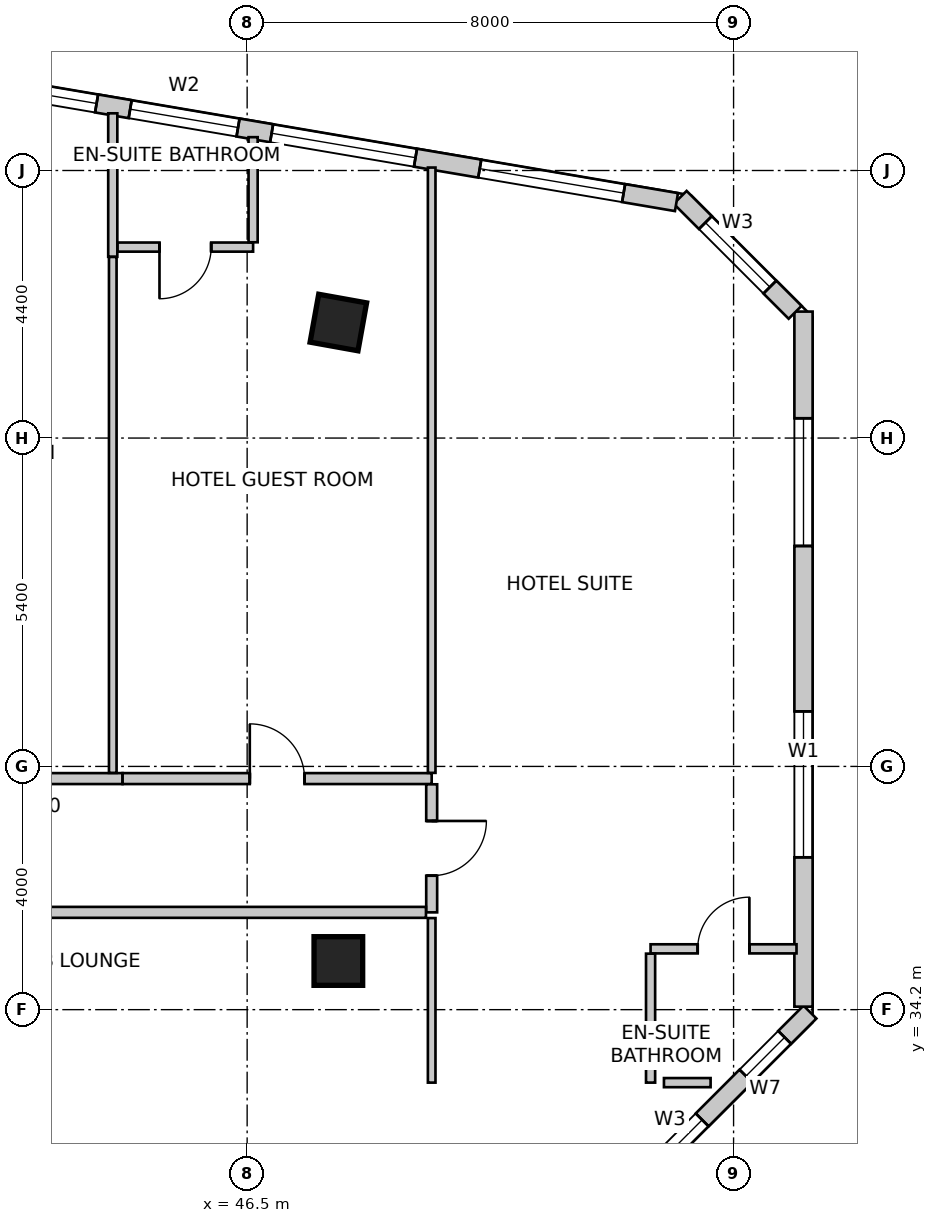
"""IFC4 building model, lengths in metres.
Left out: names, types, materials, properties, quantities, classifications, styles, units other than length and angle.
Written with IfcOpenShell. Run it as: python <this file> out.ifc"""

import sys

from ifc_helpers import new_model, si_unit, direction, frame, frame_2d, origin, origin_2d, place, context, subcontext, project, spatial, rectangle, extrude, source, transform, mapped, element, fill, save


model = new_model("IFC4")
c1 = context("Model", 3, precision=1e-05, world=origin(), true_north=direction((0.0, 1.0)))
c2 = subcontext(c1, "Body", "Model", "MODEL_VIEW")
j1 = project(units=[si_unit("LENGTHUNIT", "METRE"), si_unit("PLANEANGLEUNIT", "RADIAN")], contexts=[c1])
p1 = place(None, origin())
s1 = spatial("IfcSite", under=j1, at=p1, CompositionType="ELEMENT")
p2 = place(p1, origin())
s2 = spatial("IfcBuilding", under=s1, at=p2, CompositionType="ELEMENT")
p3 = place(p2, frame((0.0, 0.0, 117.8)))
s3 = spatial("IfcBuildingStorey", under=s2, at=p3, CompositionType="ELEMENT", Elevation=117.8)
m1 = source(origin(), c2, "Body", "SweptSolid", [
    extrude(rectangle(XDim=0.8, YDim=0.8, at=origin_2d()), origin(), (0.0, 0.0, 1.0), 3.6),
])
for number, where, z_axis, x_axis in (
    (1, (48.0, 45.5, 0.0), (0.0, 0.0, 1.0), (0.984, -0.177, 0.0)),
    (2, (48.0, 35.0, 0.0), (0.0, 0.0, 1.0), (1.0, 0.0, 0.0)),
):
    element("IfcColumn", number, at=place(p3, frame(where, z_axis=z_axis, x_axis=x_axis)), inside=s3, PredefinedType="COLUMN", context=c2, shape_type="MappedRepresentation", body=[
        mapped(m1, transform((0.0, 0.0, 0.0), scale=1.0)),
    ])
p4 = place(p3, frame((52.476, 30.88, 0.0), z_axis=(0.0, 0.0, 1.0), x_axis=(0.707106781187, 0.707106781187, 0.0)))
e3 = element("IfcWall", 3, at=p4, inside=s3, PredefinedType="SOLIDWALL", context=c2, shape_type="SweptSolid", body=[
    extrude(rectangle(XDim=4.639, YDim=0.3, at=frame_2d((2.319, 0.0))), origin(), (0.0, 0.0, 1.0), 3.35),
])
m2 = source(origin(), c2, "Body", "SweptSolid", [
    extrude(rectangle(XDim=1.5, YDim=1.8, at=frame_2d((0.75, 0.9))), frame((0.0, 0.16, 0.0), z_axis=(0.0, -1.0, 0.0), x_axis=(1.0, 0.0, 0.0)), (0.0, 0.0, 1.0), 0.32),
])
p5 = place(p4, frame((0.632, 0.0, 0.85)))
e4 = element("IfcOpeningElement", 4, at=p5, cuts=e3, PredefinedType="OPENING", context=c2, shape_type="MappedRepresentation", body=[
    mapped(m2, transform((0.0, 0.0, 0.0), scale=1.0)),
])
m3 = source(origin(), c2, "Body", "SweptSolid", [
    extrude(rectangle(XDim=0.9, YDim=1.6, at=frame_2d((0.45, 0.8))), frame((0.0, 0.16, 0.0), z_axis=(0.0, -1.0, 0.0), x_axis=(1.0, 0.0, 0.0)), (0.0, 0.0, 1.0), 0.32),
])
p6 = place(p4, frame((3.151, 0.0, 0.85)))
e5 = element("IfcOpeningElement", 5, at=p6, cuts=e3, PredefinedType="OPENING", context=c2, shape_type="MappedRepresentation", body=[
    mapped(m3, transform((0.0, 0.0, 0.0), scale=1.0)),
])
p7 = place(p3, frame((55.65, 34.249, 0.0), z_axis=(0.0, 0.0, 1.0), x_axis=(0.0, 1.0, 0.0)))
e6 = element("IfcWall", 6, at=p7, inside=s3, PredefinedType="SOLIDWALL", context=c2, shape_type="SweptSolid", body=[
    extrude(rectangle(XDim=11.431, YDim=0.3, at=frame_2d((5.715, 0.0))), origin(), (0.0, 0.0, 1.0), 3.35),
])
m4 = source(origin(), c2, "Body", "SweptSolid", [
    extrude(rectangle(XDim=2.4, YDim=2.2, at=frame_2d((1.2, 1.1))), frame((0.0, 0.16, 0.0), z_axis=(0.0, -1.0, 0.0), x_axis=(1.0, 0.0, 0.0)), (0.0, 0.0, 1.0), 0.32),
])
p8 = place(p7, frame((2.456, 0.0, 0.85)))
e7 = element("IfcOpeningElement", 7, at=p8, cuts=e6, PredefinedType="OPENING", context=c2, shape_type="MappedRepresentation", body=[
    mapped(m4, transform((0.0, 0.0, 0.0), scale=1.0)),
])
m5 = source(origin(), c2, "Body", "SweptSolid", [
    extrude(rectangle(XDim=2.1, YDim=2.0, at=frame_2d((1.05, 1.0))), frame((0.0, 0.16, 0.0), z_axis=(0.0, -1.0, 0.0), x_axis=(1.0, 0.0, 0.0)), (0.0, 0.0, 1.0), 0.32),
])
p9 = place(p7, frame((7.576, 0.0, 0.85)))
e8 = element("IfcOpeningElement", 8, at=p9, cuts=e6, PredefinedType="OPENING", context=c2, shape_type="MappedRepresentation", body=[
    mapped(m5, transform((0.0, 0.0, 0.0), scale=1.0)),
])
p10 = place(p3, frame((55.512, 45.668, 0.0), z_axis=(0.0, 0.0, 1.0), x_axis=(-0.707152443695, 0.707061115729, 0.0)))
e9 = element("IfcWall", 9, at=p10, inside=s3, PredefinedType="SOLIDWALL", context=c2, shape_type="SweptSolid", body=[
    extrude(rectangle(XDim=2.673, YDim=0.3, at=frame_2d((1.337, 0.0))), origin(), (0.0, 0.0, 1.0), 3.35),
])
p11 = place(p10, frame((0.587, 0.0, 0.85)))
e10 = element("IfcOpeningElement", 10, at=p11, cuts=e9, PredefinedType="OPENING", context=c2, shape_type="MappedRepresentation", body=[
    mapped(m2, transform((0.0, 0.0, 0.0), scale=1.0)),
])
p12 = place(p3, frame((53.561, 47.48, 0.0), z_axis=(0.0, 0.0, 1.0), x_axis=(-0.985845173895, 0.167658262868, 0.0)))
e11 = element("IfcWall", 11, at=p12, inside=s3, PredefinedType="SOLIDWALL", context=c2, shape_type="SweptSolid", body=[
    extrude(rectangle(XDim=32.132, YDim=0.3, at=frame_2d((16.066, 0.0))), origin(), (0.0, 0.0, 1.0), 3.35),
])
p13 = place(p12, frame((0.882, 0.0, 0.85)))
e12 = element("IfcOpeningElement", 12, at=p13, cuts=e11, PredefinedType="OPENING", context=c2, shape_type="MappedRepresentation", body=[
    mapped(m4, transform((0.0, 0.0, 0.0), scale=1.0)),
])
p14 = place(p12, frame((4.354, 0.0, 0.85)))
e13 = element("IfcOpeningElement", 13, at=p14, cuts=e11, PredefinedType="OPENING", context=c2, shape_type="MappedRepresentation", body=[
    mapped(m4, transform((0.0, 0.0, 0.0), scale=1.0)),
])
m6 = source(origin(), c2, "Body", "SweptSolid", [
    extrude(rectangle(XDim=1.8, YDim=2.1, at=frame_2d((0.9, 1.05))), frame((0.0, 0.16, 0.0), z_axis=(0.0, -1.0, 0.0), x_axis=(1.0, 0.0, 0.0)), (0.0, 0.0, 1.0), 0.32),
])
p15 = place(p12, frame((7.314, 0.0, 0.85)))
e14 = element("IfcOpeningElement", 14, at=p15, cuts=e11, PredefinedType="OPENING", context=c2, shape_type="MappedRepresentation", body=[
    mapped(m6, transform((0.0, 0.0, 0.0), scale=1.0)),
])
p16 = place(p12, frame((9.674, 0.0, 0.85)))
e15 = element("IfcOpeningElement", 15, at=p16, cuts=e11, PredefinedType="OPENING", context=c2, shape_type="MappedRepresentation", body=[
    mapped(m4, transform((0.0, 0.0, 0.0), scale=1.0)),
])
p17 = place(p12, frame((12.634, 0.0, 0.85)))
e16 = element("IfcOpeningElement", 16, at=p17, cuts=e11, PredefinedType="OPENING", context=c2, shape_type="MappedRepresentation", body=[
    mapped(m6, transform((0.0, 0.0, 0.0), scale=1.0)),
])
p18 = place(p12, frame((14.994, 0.0, 0.85)))
e17 = element("IfcOpeningElement", 17, at=p18, cuts=e11, PredefinedType="OPENING", context=c2, shape_type="MappedRepresentation", body=[
    mapped(m4, transform((0.0, 0.0, 0.0), scale=1.0)),
])
p19 = place(p12, frame((17.936, 0.0, 0.85)))
e18 = element("IfcOpeningElement", 18, at=p19, cuts=e11, PredefinedType="OPENING", context=c2, shape_type="MappedRepresentation", body=[
    mapped(m6, transform((0.0, 0.0, 0.0), scale=1.0)),
])
p20 = place(p12, frame((20.309, 0.0, 0.85)))
e19 = element("IfcOpeningElement", 19, at=p20, cuts=e11, PredefinedType="OPENING", context=c2, shape_type="MappedRepresentation", body=[
    mapped(m4, transform((0.0, 0.0, 0.0), scale=1.0)),
])
p21 = place(p12, frame((25.4, 0.0, 0.85)))
e20 = element("IfcOpeningElement", 20, at=p21, cuts=e11, PredefinedType="OPENING", context=c2, shape_type="MappedRepresentation", body=[
    mapped(m4, transform((0.0, 0.0, 0.0), scale=1.0)),
])
m7 = source(origin(), c2, "Body", "SweptSolid", [
    extrude(rectangle(XDim=1.2, YDim=1.6, at=frame_2d((0.6, 0.8))), frame((0.0, 0.16, 0.0), z_axis=(0.0, -1.0, 0.0), x_axis=(1.0, 0.0, 0.0)), (0.0, 0.0, 1.0), 0.32),
])
p22 = place(p12, frame((30.5, 0.0, 0.85)))
e21 = element("IfcOpeningElement", 21, at=p22, cuts=e11, PredefinedType="OPENING", context=c2, shape_type="MappedRepresentation", body=[
    mapped(m7, transform((0.0, 0.0, 0.0), scale=1.0)),
])
p23 = place(p3, frame((39.207, 38.0, 0.0), z_axis=(0.0, 0.0, 1.0), x_axis=(1.0, 0.0, 0.0)))
e22 = element("IfcWall", 22, at=p23, inside=s3, PredefinedType="PARTITIONING", context=c2, shape_type="SweptSolid", body=[
    extrude(rectangle(XDim=5.243, YDim=0.18, at=frame_2d((2.622, 0.0))), origin(), (0.0, 0.0, 1.0), 2.879),
])
m8 = source(origin(), c2, "Body", "SweptSolid", [
    extrude(rectangle(XDim=0.9, YDim=2.15, at=frame_2d((0.45, 1.075))), frame((0.0, 0.1, 0.0), z_axis=(0.0, -1.0, 0.0), x_axis=(1.0, 0.0, 0.0)), (0.0, 0.0, 1.0), 0.2),
])
p24 = place(p23, frame((2.111, 0.0, 0.0)))
e23 = element("IfcOpeningElement", 23, at=p24, cuts=e22, PredefinedType="OPENING", context=c2, shape_type="MappedRepresentation", body=[
    mapped(m8, transform((0.0, 0.0, 0.0), scale=1.0)),
])
p25 = place(p3, frame((44.452, 38.0, 0.0), z_axis=(0.0, 0.0, 1.0), x_axis=(1.0, 0.0, 0.0)))
e24 = element("IfcWall", 24, at=p25, inside=s3, PredefinedType="PARTITIONING", context=c2, shape_type="SweptSolid", body=[
    extrude(rectangle(XDim=5.083, YDim=0.18, at=frame_2d((2.542, 0.0))), origin(), (0.0, 0.0, 1.0), 2.803),
])
p26 = place(p25, frame((2.092, 0.0, 0.0)))
e25 = element("IfcOpeningElement", 25, at=p26, cuts=e24, PredefinedType="OPENING", context=c2, shape_type="MappedRepresentation", body=[
    mapped(m8, transform((0.0, 0.0, 0.0), scale=1.0)),
])
p27 = place(p3, frame((49.535, 37.906, 0.0), z_axis=(0.0, 0.0, 1.0), x_axis=(0.0, -1.0, 0.0)))
e26 = element("IfcWall", 26, at=p27, inside=s3, PredefinedType="PARTITIONING", context=c2, shape_type="SweptSolid", body=[
    extrude(rectangle(XDim=2.106, YDim=0.18, at=frame_2d((1.053, 0.0))), origin(), (0.0, 0.0, 1.0), 3.35),
])
p28 = place(p27, frame((0.603, 0.0, 0.0)))
e27 = element("IfcOpeningElement", 27, at=p28, cuts=e26, PredefinedType="OPENING", context=c2, shape_type="MappedRepresentation", body=[
    mapped(m8, transform((0.0, 0.0, 0.0), scale=1.0)),
])
p29 = place(p3, frame((49.441, 35.8, 0.0), z_axis=(0.0, 0.0, 1.0), x_axis=(-1.0, 0.0, 0.0)))
e28 = element("IfcWall", 28, at=p29, inside=s3, PredefinedType="PARTITIONING", context=c2, shape_type="SweptSolid", body=[
    extrude(rectangle(XDim=15.641, YDim=0.18, at=frame_2d((7.82, 0.0))), origin(), (0.0, 0.0, 1.0), 2.803),
])
p30 = place(p29, frame((7.371, 0.0, 0.0)))
e29 = element("IfcOpeningElement", 29, at=p30, cuts=e28, PredefinedType="OPENING", context=c2, shape_type="MappedRepresentation", body=[
    mapped(m8, transform((0.0, 0.0, 0.0), scale=1.0)),
])
p31 = place(p3, frame((44.29, 48.94, 0.0), z_axis=(0.0, 0.0, 1.0), x_axis=(0.0, -1.0, 0.0)))
e30 = element("IfcWall", 30, at=p31, inside=s3, PredefinedType="PARTITIONING", context=c2, shape_type="SweptSolid", body=[
    extrude(rectangle(XDim=2.36, YDim=0.15, at=frame_2d((1.18, 0.0))), origin(), (0.0, 0.0, 1.0), 3.35),
])
p32 = place(p3, frame((44.29, 46.579, 0.0), z_axis=(0.0, 0.0, 1.0), x_axis=(0.0, -1.0, 0.0)))
e31 = element("IfcWall", 31, at=p32, inside=s3, PredefinedType="PARTITIONING", context=c2, shape_type="SweptSolid", body=[
    extrude(rectangle(XDim=8.485, YDim=0.125, at=frame_2d((4.242, 0.0))), origin(), (0.0, 0.0, 1.0), 2.492),
])
p33 = place(p3, frame((46.598, 46.74, 0.0), z_axis=(0.0, 0.0, 1.0), x_axis=(-1.0, 0.0, 0.0)))
e32 = element("IfcWall", 32, at=p33, inside=s3, PredefinedType="PARTITIONING", context=c2, shape_type="SweptSolid", body=[
    extrude(rectangle(XDim=2.229, YDim=0.15, at=frame_2d((1.115, 0.0))), origin(), (0.0, 0.0, 1.0), 3.35),
])
m9 = source(origin(), c2, "Body", "SweptSolid", [
    extrude(rectangle(XDim=0.85, YDim=2.15, at=frame_2d((0.425, 1.075))), frame((0.0, 0.085, 0.0), z_axis=(0.0, -1.0, 0.0), x_axis=(1.0, 0.0, 0.0)), (0.0, 0.0, 1.0), 0.17),
])
p34 = place(p33, frame((0.689, 0.0, 0.0)))
e33 = element("IfcOpeningElement", 33, at=p34, cuts=e32, PredefinedType="OPENING", context=c2, shape_type="MappedRepresentation", body=[
    mapped(m9, transform((0.0, 0.0, 0.0), scale=1.0)),
])
p35 = place(p3, frame((46.598, 48.548, 0.0), z_axis=(0.0, 0.0, 1.0), x_axis=(0.0, -1.0, 0.0)))
e34 = element("IfcWall", 34, at=p35, inside=s3, PredefinedType="PARTITIONING", context=c2, shape_type="SweptSolid", body=[
    extrude(rectangle(XDim=1.729, YDim=0.15, at=frame_2d((0.864, 0.0))), origin(), (0.0, 0.0, 1.0), 3.35),
])
p36 = place(p3, frame((49.535, 48.049, 0.0), z_axis=(0.0, 0.0, 1.0), x_axis=(0.0, -1.0, 0.0)))
e35 = element("IfcWall", 35, at=p36, inside=s3, PredefinedType="PARTITIONING", context=c2, shape_type="SweptSolid", body=[
    extrude(rectangle(XDim=9.955, YDim=0.125, at=frame_2d((4.977, 0.0))), origin(), (0.0, 0.0, 1.0), 3.35),
])
p37 = place(p3, frame((53.135, 35.2, 0.0), z_axis=(0.0, 0.0, 1.0), x_axis=(1.0, 0.0, 0.0)))
e36 = element("IfcWall", 36, at=p37, inside=s3, PredefinedType="PARTITIONING", context=c2, shape_type="SweptSolid", body=[
    extrude(rectangle(XDim=2.4, YDim=0.15, at=frame_2d((1.2, 0.0))), origin(), (0.0, 0.0, 1.0), 3.35),
])
p38 = place(p37, frame((0.775, 0.0, 0.0)))
e37 = element("IfcOpeningElement", 37, at=p38, cuts=e36, PredefinedType="OPENING", context=c2, shape_type="MappedRepresentation", body=[
    mapped(m9, transform((0.0, 0.0, 0.0), scale=1.0)),
])
p39 = place(p3, frame((53.135, 33.0, 0.0), z_axis=(0.0, 0.0, 1.0), x_axis=(0.0, 1.0, 0.0)))
e38 = element("IfcWall", 38, at=p39, inside=s3, PredefinedType="PARTITIONING", context=c2, shape_type="SweptSolid", body=[
    extrude(rectangle(XDim=2.121, YDim=0.15, at=frame_2d((1.061, 0.0))), origin(), (0.0, 0.0, 1.0), 3.35),
])
p40 = place(p3, frame((49.535, 33.0, 0.0), z_axis=(0.0, 0.0, 1.0), x_axis=(0.0, 1.0, 0.0)))
e39 = element("IfcWall", 39, at=p40, inside=s3, PredefinedType="PARTITIONING", context=c2, shape_type="SweptSolid", body=[
    extrude(rectangle(XDim=2.706, YDim=0.125, at=frame_2d((1.353, 0.0))), origin(), (0.0, 0.0, 1.0), 3.35),
])
p41 = place(p3, frame((54.122, 33.0, 0.0), z_axis=(0.0, 0.0, 1.0), x_axis=(-1.0, 0.0, 0.0)))
e40 = element("IfcWall", 40, at=p41, inside=s3, PredefinedType="PARTITIONING", context=c2, shape_type="SweptSolid", body=[
    extrude(rectangle(XDim=0.767, YDim=0.15, at=frame_2d((0.384, 0.0))), origin(), (0.0, 0.0, 1.0), 3.35),
])
m10 = source(origin(), c2, "Body", "SweptSolid", [
    extrude(rectangle(XDim=1.5, YDim=1.8, at=frame_2d((0.75, 0.9))), frame((0.0, -0.015, 0.0), z_axis=(0.0, -1.0, 0.0), x_axis=(1.0, 0.0, 0.0)), (0.0, 0.0, 1.0), 0.06),
])
p42 = place(p5, origin())
e41 = element("IfcWindow", 41, at=p42, inside=s3, PartitioningType="SINGLE_PANEL", PredefinedType="WINDOW", context=c2, shape_type="MappedRepresentation", body=[
    mapped(m10, transform((0.0, 0.0, 0.0), scale=1.0)),
])
fill(e4, e41)
m11 = source(origin(), c2, "Body", "SweptSolid", [
    extrude(rectangle(XDim=0.9, YDim=1.6, at=frame_2d((0.45, 0.8))), frame((0.0, -0.015, 0.0), z_axis=(0.0, -1.0, 0.0), x_axis=(1.0, 0.0, 0.0)), (0.0, 0.0, 1.0), 0.06),
])
p43 = place(p6, origin())
e42 = element("IfcWindow", 42, at=p43, inside=s3, PartitioningType="SINGLE_PANEL", PredefinedType="WINDOW", context=c2, shape_type="MappedRepresentation", body=[
    mapped(m11, transform((0.0, 0.0, 0.0), scale=1.0)),
])
fill(e5, e42)
m12 = source(origin(), c2, "Body", "SweptSolid", [
    extrude(rectangle(XDim=2.4, YDim=2.2, at=frame_2d((1.2, 1.1))), frame((0.0, -0.015, 0.0), z_axis=(0.0, -1.0, 0.0), x_axis=(1.0, 0.0, 0.0)), (0.0, 0.0, 1.0), 0.06),
])
p44 = place(p8, origin())
e43 = element("IfcWindow", 43, at=p44, inside=s3, PartitioningType="SINGLE_PANEL", PredefinedType="WINDOW", context=c2, shape_type="MappedRepresentation", body=[
    mapped(m12, transform((0.0, 0.0, 0.0), scale=1.0)),
])
fill(e7, e43)
m13 = source(origin(), c2, "Body", "SweptSolid", [
    extrude(rectangle(XDim=2.1, YDim=2.0, at=frame_2d((1.05, 1.0))), frame((0.0, -0.015, 0.0), z_axis=(0.0, -1.0, 0.0), x_axis=(1.0, 0.0, 0.0)), (0.0, 0.0, 1.0), 0.06),
])
p45 = place(p9, origin())
e44 = element("IfcWindow", 44, at=p45, inside=s3, PartitioningType="SINGLE_PANEL", PredefinedType="WINDOW", context=c2, shape_type="MappedRepresentation", body=[
    mapped(m13, transform((0.0, 0.0, 0.0), scale=1.0)),
])
fill(e8, e44)
p46 = place(p11, origin())
e45 = element("IfcWindow", 45, at=p46, inside=s3, PartitioningType="SINGLE_PANEL", PredefinedType="WINDOW", context=c2, shape_type="MappedRepresentation", body=[
    mapped(m10, transform((0.0, 0.0, 0.0), scale=1.0)),
])
fill(e10, e45)
p47 = place(p13, origin())
e46 = element("IfcWindow", 46, at=p47, inside=s3, PartitioningType="SINGLE_PANEL", PredefinedType="WINDOW", context=c2, shape_type="MappedRepresentation", body=[
    mapped(m12, transform((0.0, 0.0, 0.0), scale=1.0)),
])
fill(e12, e46)
p48 = place(p14, origin())
e47 = element("IfcWindow", 47, at=p48, inside=s3, PartitioningType="SINGLE_PANEL", PredefinedType="WINDOW", context=c2, shape_type="MappedRepresentation", body=[
    mapped(m12, transform((0.0, 0.0, 0.0), scale=1.0)),
])
fill(e13, e47)
m14 = source(origin(), c2, "Body", "SweptSolid", [
    extrude(rectangle(XDim=1.8, YDim=2.1, at=frame_2d((0.9, 1.05))), frame((0.0, -0.015, 0.0), z_axis=(0.0, -1.0, 0.0), x_axis=(1.0, 0.0, 0.0)), (0.0, 0.0, 1.0), 0.06),
])
p49 = place(p15, origin())
e48 = element("IfcWindow", 48, at=p49, inside=s3, PartitioningType="SINGLE_PANEL", PredefinedType="WINDOW", context=c2, shape_type="MappedRepresentation", body=[
    mapped(m14, transform((0.0, 0.0, 0.0), scale=1.0)),
])
fill(e14, e48)
p50 = place(p16, origin())
e49 = element("IfcWindow", 49, at=p50, inside=s3, PartitioningType="SINGLE_PANEL", PredefinedType="WINDOW", context=c2, shape_type="MappedRepresentation", body=[
    mapped(m12, transform((0.0, 0.0, 0.0), scale=1.0)),
])
fill(e15, e49)
m15 = source(origin(), c2, "Body", "SweptSolid", [
    extrude(rectangle(XDim=0.85, YDim=2.15, at=frame_2d((0.425, 1.075))), frame((0.0, 0.025, 0.0), z_axis=(0.0, -1.0, 0.0), x_axis=(1.0, 0.0, 0.0)), (0.0, 0.0, 1.0), 0.05),
])
p51 = place(p34, origin())
e50 = element("IfcDoor", 50, at=p51, inside=s3, OperationType="SINGLE_SWING_RIGHT", PredefinedType="DOOR", context=c2, shape_type="MappedRepresentation", body=[
    mapped(m15, transform((0.0, 0.0, 0.0), scale=1.0)),
])
fill(e33, e50)
m16 = source(origin(), c2, "Body", "SweptSolid", [
    extrude(rectangle(XDim=0.9, YDim=2.15, at=frame_2d((0.45, 1.075))), frame((0.0, 0.025, 0.0), z_axis=(0.0, -1.0, 0.0), x_axis=(1.0, 0.0, 0.0)), (0.0, 0.0, 1.0), 0.05),
])
p52 = place(p26, origin())
e51 = element("IfcDoor", 51, at=p52, inside=s3, OperationType="SINGLE_SWING_LEFT", PredefinedType="DOOR", context=c2, shape_type="MappedRepresentation", body=[
    mapped(m16, transform((0.0, 0.0, 0.0), scale=1.0)),
])
fill(e25, e51)
p53 = place(p38, origin())
e52 = element("IfcDoor", 52, at=p53, inside=s3, OperationType="SINGLE_SWING_RIGHT", PredefinedType="DOOR", context=c2, shape_type="MappedRepresentation", body=[
    mapped(m15, transform((0.0, 0.0, 0.0), scale=1.0)),
])
fill(e37, e52)
p54 = place(p28, origin())
e53 = element("IfcDoor", 53, at=p54, inside=s3, OperationType="SINGLE_SWING_LEFT", PredefinedType="DOOR", context=c2, shape_type="MappedRepresentation", body=[
    mapped(m16, transform((0.0, 0.0, 0.0), scale=1.0)),
])
fill(e27, e53)
save(model, sys.argv[1])
